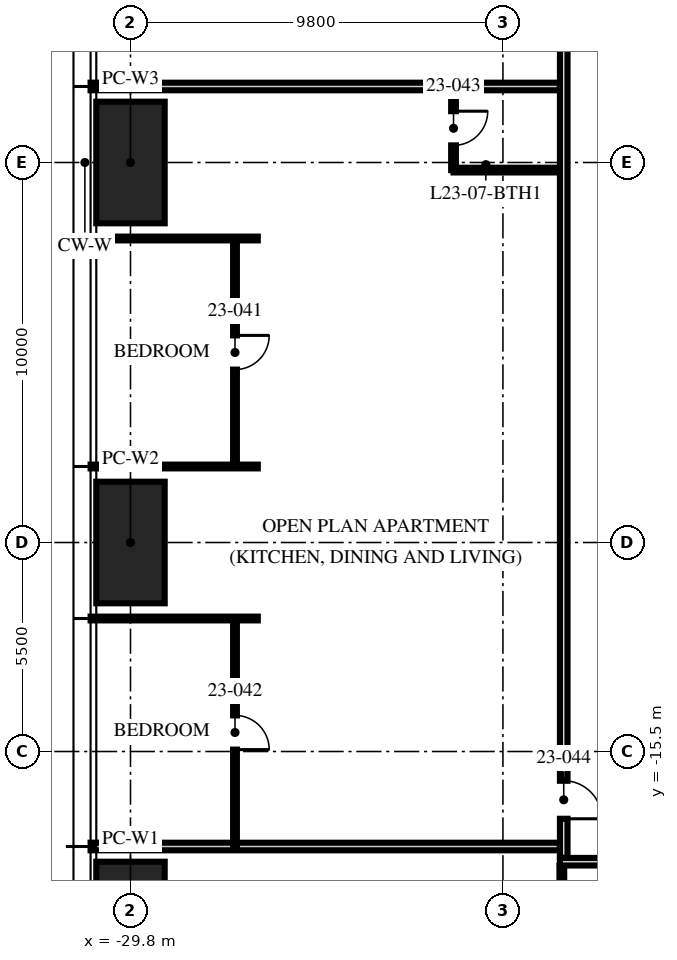
"""IFC4 building model, lengths in metres.
Left out: names, types, materials, properties, quantities, classifications, styles, units other than length and angle.
Written with IfcOpenShell. Run it as: python <this file> out.ifc"""

import sys

from ifc_helpers import new_model, si_unit, direction, frame, frame_2d, origin, origin_2d, place, context, subcontext, project, spatial, rectangle, hollow_rectangle, extrude, element, fill, save


model = new_model("IFC4")
c1 = context("Model", 3, precision=1e-05, world=origin(), true_north=direction((0.0, 1.0)))
c2 = subcontext(c1, "Body", "Model", "MODEL_VIEW")
j1 = project(units=[si_unit("LENGTHUNIT", "METRE"), si_unit("PLANEANGLEUNIT", "RADIAN")], contexts=[c1])
p1 = place(None, origin())
s1 = spatial("IfcSite", under=j1, at=p1, CompositionType="ELEMENT")
p2 = place(p1, origin())
s2 = spatial("IfcBuilding", under=s1, at=p2, CompositionType="ELEMENT")
p3 = place(p2, frame((0.0, 0.0, 92.25)))
s3 = spatial("IfcBuildingStorey", under=s2, at=p3, CompositionType="ELEMENT", Elevation=92.25)
for number, where, z_axis, x_axis in (
    (1, (-29.8, -20.0, 0.0), (0.0, 0.0, 1.0), (0.0, 1.0, 0.0)),
    (2, (-29.8, -10.0, 0.0), (0.0, 0.0, 1.0), (0.0, 1.0, 0.0)),
    (3, (-29.8, 0.0, 0.0), (0.0, 0.0, 1.0), (0.0, 1.0, 0.0)),
):
    element("IfcColumn", number, at=place(p3, frame(where, z_axis=z_axis, x_axis=x_axis)), inside=s3, PredefinedType="COLUMN", context=c2, shape_type="SweptSolid", body=[
        extrude(hollow_rectangle(XDim=3.2, YDim=1.8, WallThickness=0.2, at=origin_2d()), origin(), (0.0, 0.0, 1.0), 3.75),
    ])
p4 = place(p3, frame((-18.5, 2.0, 0.0), z_axis=(0.0, 0.0, 1.0), x_axis=(-1.0, 0.0, 0.0)))
e4 = element("IfcWall", 4, at=p4, inside=s3, PredefinedType="PARTITIONING", context=c2, shape_type="SweptSolid", body=[
    extrude(rectangle(XDim=12.35, YDim=0.2, at=frame_2d((6.175, 0.0))), origin(), (0.0, 0.0, 1.0), 2.61),
])
for number, where, z_axis, x_axis in (
    (5, (-26.45, -2.0, 0.0), (0.0, 0.0, 1.0), (-1.0, 0.0, 0.0)),
    (6, (-26.45, -8.0, 0.0), (0.0, 0.0, 1.0), (-1.0, 0.0, 0.0)),
    (7, (-26.45, -12.0, 0.0), (0.0, 0.0, 1.0), (-1.0, 0.0, 0.0)),
):
    element("IfcWall", number, at=place(p3, frame(where, z_axis=z_axis, x_axis=x_axis)), inside=s3, PredefinedType="PARTITIONING", context=c2, shape_type="SweptSolid", body=[
        extrude(rectangle(XDim=4.4, YDim=0.1, at=frame_2d((2.2, 0.0))), origin(), (0.0, 0.0, 1.0), 2.61),
    ])
p5 = place(p3, frame((-18.5, -18.0, 0.0), z_axis=(0.0, 0.0, 1.0), x_axis=(-1.0, 0.0, 0.0)))
e8 = element("IfcWall", 8, at=p5, inside=s3, PredefinedType="PARTITIONING", context=c2, shape_type="SweptSolid", body=[
    extrude(rectangle(XDim=12.35, YDim=0.2, at=frame_2d((6.175, 0.0))), origin(), (0.0, 0.0, 1.0), 2.3),
])
p6 = place(p3, frame((-27.05, -2.0, 0.0), z_axis=(0.0, 0.0, 1.0), x_axis=(0.0, -1.0, 0.0)))
e9 = element("IfcWall", 9, at=p6, inside=s3, PredefinedType="PARTITIONING", context=c2, shape_type="SweptSolid", body=[
    extrude(rectangle(XDim=6.0, YDim=0.1, at=frame_2d((3.0, 0.0))), origin(), (0.0, 0.0, 1.0), 2.6),
])
p7 = place(p6, frame((2.55, 0.0, 0.0)))
e10 = element("IfcOpeningElement", 10, at=p7, cuts=e9, PredefinedType="OPENING", context=c2, shape_type="SweptSolid", body=[
    extrude(rectangle(XDim=0.9, YDim=2.1, at=frame_2d((0.45, 1.05))), frame((0.0, 0.06, 0.0), z_axis=(0.0, -1.0, 0.0), x_axis=(1.0, 0.0, 0.0)), (0.0, 0.0, 1.0), 0.12),
])
p8 = place(p3, frame((-27.05, -12.0, 0.0), z_axis=(0.0, 0.0, 1.0), x_axis=(0.0, -1.0, 0.0)))
e11 = element("IfcWall", 11, at=p8, inside=s3, PredefinedType="PARTITIONING", context=c2, shape_type="SweptSolid", body=[
    extrude(rectangle(XDim=6.0, YDim=0.1, at=frame_2d((3.0, 0.0))), origin(), (0.0, 0.0, 1.0), 2.6),
])
p9 = place(p8, frame((2.55, 0.0, 0.0)))
e12 = element("IfcOpeningElement", 12, at=p9, cuts=e11, PredefinedType="OPENING", context=c2, shape_type="SweptSolid", body=[
    extrude(rectangle(XDim=0.9, YDim=2.1, at=frame_2d((0.45, 1.05))), frame((0.0, 0.06, 0.0), z_axis=(0.0, -1.0, 0.0), x_axis=(1.0, 0.0, 0.0)), (0.0, 0.0, 1.0), 0.12),
])
p10 = place(p3, frame((-21.3, 2.0, 0.0), z_axis=(0.0, 0.0, 1.0), x_axis=(0.0, -1.0, 0.0)))
e13 = element("IfcWall", 13, at=p10, inside=s3, PredefinedType="PARTITIONING", context=c2, shape_type="SweptSolid", body=[
    extrude(rectangle(XDim=2.2, YDim=0.125, at=frame_2d((1.1, 0.0))), origin(), (0.0, 0.0, 1.0), 2.492),
])
p11 = place(p10, frame((0.65, 0.0, 0.0)))
e14 = element("IfcOpeningElement", 14, at=p11, cuts=e13, PredefinedType="OPENING", context=c2, shape_type="SweptSolid", body=[
    extrude(rectangle(XDim=0.9, YDim=2.1, at=frame_2d((0.45, 1.05))), frame((0.0, 0.073, 0.0), z_axis=(0.0, -1.0, 0.0), x_axis=(1.0, 0.0, 0.0)), (0.0, 0.0, 1.0), 0.145),
])
p12 = place(p3, frame((-18.5, -0.2, 0.0), z_axis=(0.0, 0.0, 1.0), x_axis=(-1.0, 0.0, 0.0)))
e15 = element("IfcWall", 15, at=p12, inside=s3, PredefinedType="PARTITIONING", context=c2, shape_type="SweptSolid", body=[
    extrude(rectangle(XDim=2.8, YDim=0.125, at=frame_2d((1.4, 0.0))), origin(), (0.0, 0.0, 1.0), 2.492),
])
p13 = place(p3, frame((-18.45, -18.5, 0.0), z_axis=(0.0, 0.0, 1.0), x_axis=(0.0, -1.0, 0.0)))
e16 = element("IfcWall", 16, at=p13, inside=s3, PredefinedType="PARTITIONING", context=c2, shape_type="SweptSolid", body=[
    extrude(rectangle(XDim=2.8, YDim=0.125, at=frame_2d((1.4, 0.0))), origin(), (0.0, 0.0, 1.0), 2.3),
])
p14 = place(p3, frame((-18.4, 6.0, 0.0), z_axis=(0.0, 0.0, 1.0), x_axis=(0.0, -1.0, 0.0)))
e17 = element("IfcWall", 17, at=p14, inside=s3, PredefinedType="PARTITIONING", context=c2, shape_type="SweptSolid", body=[
    extrude(rectangle(XDim=24.3, YDim=0.2, at=frame_2d((12.15, 0.0))), origin(), (0.0, 0.0, 1.0), 2.3),
])
p15 = place(p14, frame((22.27, 0.0, 0.0)))
e18 = element("IfcOpeningElement", 18, at=p15, cuts=e17, PredefinedType="OPENING", context=c2, shape_type="SweptSolid", body=[
    extrude(rectangle(XDim=1.0, YDim=2.2, at=frame_2d((0.5, 1.1))), frame((0.0, 0.11, 0.0), z_axis=(0.0, -1.0, 0.0), x_axis=(1.0, 0.0, 0.0)), (0.0, 0.0, 1.0), 0.22),
])
p16 = place(p3, frame((-10.0, -18.4, 0.0), z_axis=(0.0, 0.0, 1.0), x_axis=(-1.0, 0.0, 0.0)))
e19 = element("IfcWall", 19, at=p16, inside=s3, PredefinedType="PARTITIONING", context=c2, shape_type="SweptSolid", body=[
    extrude(rectangle(XDim=8.5, YDim=0.2, at=frame_2d((4.25, 0.0))), origin(), (0.0, 0.0, 1.0), 2.3),
])
p17 = place(p7, origin())
e20 = element("IfcDoor", 20, at=p17, inside=s3, OperationType="SINGLE_SWING_LEFT", PredefinedType="DOOR", context=c2, shape_type="SweptSolid", body=[
    extrude(rectangle(XDim=0.9, YDim=2.1, at=frame_2d((0.45, 1.05))), frame((0.0, 0.025, 0.0), z_axis=(0.0, -1.0, 0.0), x_axis=(1.0, 0.0, 0.0)), (0.0, 0.0, 1.0), 0.05),
])
fill(e10, e20)
p18 = place(p9, origin())
e21 = element("IfcDoor", 21, at=p18, inside=s3, OperationType="SINGLE_SWING_RIGHT", PredefinedType="DOOR", context=c2, shape_type="SweptSolid", body=[
    extrude(rectangle(XDim=0.9, YDim=2.1, at=frame_2d((0.45, 1.05))), frame((0.0, 0.025, 0.0), z_axis=(0.0, -1.0, 0.0), x_axis=(1.0, 0.0, 0.0)), (0.0, 0.0, 1.0), 0.05),
])
fill(e12, e21)
p19 = place(p11, origin())
e22 = element("IfcDoor", 22, at=p19, inside=s3, OperationType="SINGLE_SWING_LEFT", PredefinedType="DOOR", context=c2, shape_type="SweptSolid", body=[
    extrude(rectangle(XDim=0.9, YDim=2.1, at=frame_2d((0.45, 1.05))), frame((0.0, 0.025, 0.0), z_axis=(0.0, -1.0, 0.0), x_axis=(1.0, 0.0, 0.0)), (0.0, 0.0, 1.0), 0.05),
])
fill(e14, e22)
p20 = place(p15, origin())
e23 = element("IfcDoor", 23, at=p20, inside=s3, OperationType="SINGLE_SWING_RIGHT", PredefinedType="DOOR", context=c2, shape_type="SweptSolid", body=[
    extrude(rectangle(XDim=1.0, YDim=2.2, at=frame_2d((0.5, 1.1))), frame((0.0, 0.025, 0.0), z_axis=(0.0, -1.0, 0.0), x_axis=(1.0, 0.0, 0.0)), (0.0, 0.0, 1.0), 0.05),
])
fill(e18, e23)
save(model, sys.argv[1])
